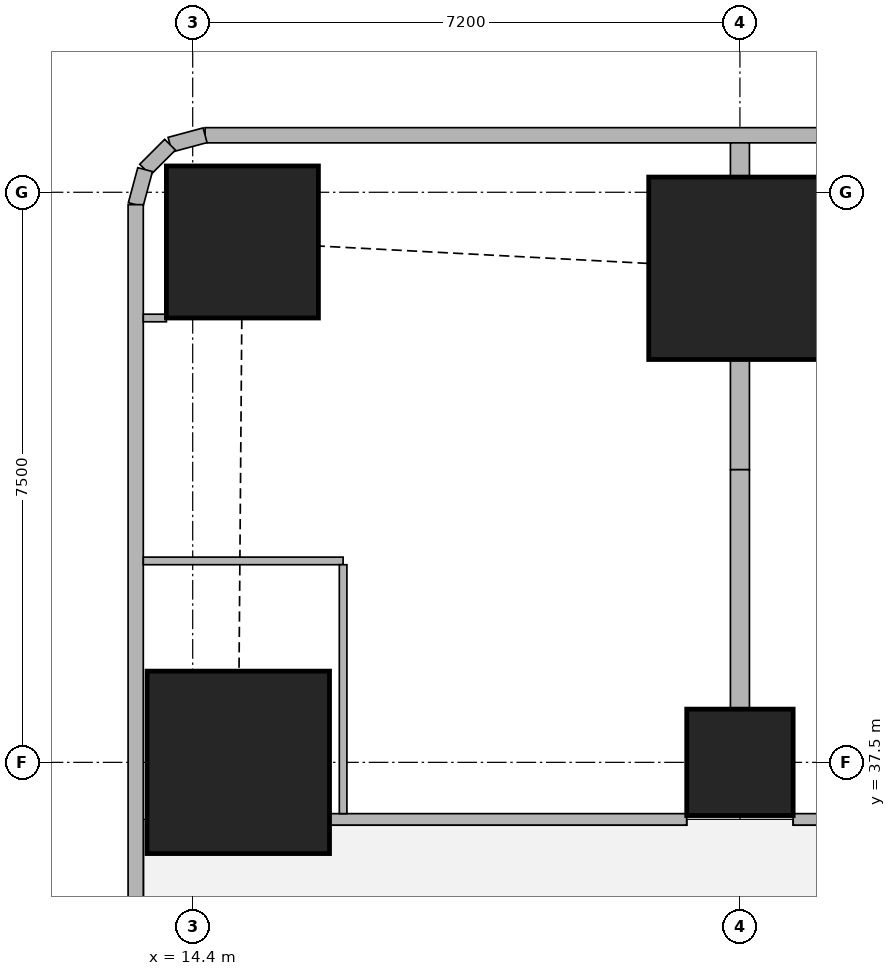
"""IFC4 building model, lengths in metres.
Left out: names, types, materials, properties, quantities, classifications, styles, units other than length and angle.
Written with IfcOpenShell. Run it as: python <this file> out.ifc"""

import sys

from ifc_helpers import new_model, si_unit, direction, frame, frame_2d, origin, origin_2d, place, context, subcontext, project, spatial, rectangle, extrude, element, fill, save


model = new_model("IFC4")
c1 = context("Model", 3, precision=1e-05, world=origin(), true_north=direction((0.0, 1.0)))
c2 = subcontext(c1, "Body", "Model", "MODEL_VIEW")
j1 = project(units=[si_unit("LENGTHUNIT", "METRE"), si_unit("PLANEANGLEUNIT", "RADIAN")], contexts=[c1])
p1 = place(None, origin())
s1 = spatial("IfcSite", under=j1, at=p1, CompositionType="ELEMENT")
p2 = place(p1, origin())
s2 = spatial("IfcBuilding", under=s1, at=p2, CompositionType="ELEMENT")
p3 = place(p2, frame((0.0, 0.0, 234.95)))
s3 = spatial("IfcBuildingStorey", under=s2, at=p3, CompositionType="ELEMENT", Elevation=234.95)
p4 = place(p3, frame((15.0, 37.5, 0.0), z_axis=(0.0, 0.0, 1.0), x_axis=(1.0, 0.0, 0.0)))
e1 = element("IfcColumn", 1, at=p4, inside=s3, PredefinedType="COLUMN", context=c2, shape_type="SweptSolid", body=[
    extrude(rectangle(XDim=2.4, YDim=2.4, at=origin_2d()), origin(), (0.0, 0.0, 1.0), 3.75),
])
p5 = place(p3, frame((21.6, 37.5, 0.0), z_axis=(0.0, 0.0, 1.0), x_axis=(1.0, 0.0, 0.0)))
e2 = element("IfcColumn", 2, at=p5, inside=s3, PredefinedType="COLUMN", context=c2, shape_type="SweptSolid", body=[
    extrude(rectangle(XDim=1.4, YDim=1.4, at=origin_2d()), origin(), (0.0, 0.0, 1.0), 3.75),
])
p6 = place(p3, frame((15.054, 44.346, 0.0), z_axis=(0.0, 0.0, 1.0), x_axis=(1.0, 0.0, 0.0)))
e3 = element("IfcColumn", 3, at=p6, inside=s3, PredefinedType="COLUMN", context=c2, shape_type="SweptSolid", body=[
    extrude(rectangle(XDim=2.0, YDim=2.0, at=origin_2d()), origin(), (0.0, 0.0, 1.0), 3.75),
])
p7 = place(p3, frame((21.6, 44.0, 0.0), z_axis=(0.0, 0.0, 1.0), x_axis=(1.0, 0.0, 0.0)))
e4 = element("IfcColumn", 4, at=p7, inside=s3, PredefinedType="COLUMN", context=c2, shape_type="SweptSolid", body=[
    extrude(rectangle(XDim=2.4, YDim=2.4, at=origin_2d()), origin(), (0.0, 0.0, 1.0), 3.75),
])
p8 = place(p3, frame((40.106, 45.75, 0.0), z_axis=(0.0, 0.0, 1.0), x_axis=(-1.0, 0.0, 0.0)))
e5 = element("IfcWall", 5, at=p8, inside=s3, PredefinedType="SOLIDWALL", context=c2, shape_type="SweptSolid", body=[
    extrude(rectangle(XDim=25.543, YDim=0.2, at=frame_2d((12.771, 0.0))), origin(), (0.0, 0.0, 1.0), 3.5),
])
p9 = place(p8, frame((8.606, 0.0, 0.9)))
e6 = element("IfcOpeningElement", 6, at=p9, cuts=e5, PredefinedType="OPENING", context=c2, shape_type="SweptSolid", body=[
    extrude(rectangle(XDim=1.8, YDim=1.5, at=frame_2d((0.9, 0.75))), frame((0.0, 0.11, 0.0), z_axis=(0.0, -1.0, 0.0), x_axis=(1.0, 0.0, 0.0)), (0.0, 0.0, 1.0), 0.22),
])
p10 = place(p8, frame((12.206, 0.0, 0.9)))
e7 = element("IfcOpeningElement", 7, at=p10, cuts=e5, PredefinedType="OPENING", context=c2, shape_type="SweptSolid", body=[
    extrude(rectangle(XDim=1.8, YDim=1.5, at=frame_2d((0.9, 0.75))), frame((0.0, 0.11, 0.0), z_axis=(0.0, -1.0, 0.0), x_axis=(1.0, 0.0, 0.0)), (0.0, 0.0, 1.0), 0.22),
])
p11 = place(p8, frame((15.806, 0.0, 0.9)))
e8 = element("IfcOpeningElement", 8, at=p11, cuts=e5, PredefinedType="OPENING", context=c2, shape_type="SweptSolid", body=[
    extrude(rectangle(XDim=1.8, YDim=1.5, at=frame_2d((0.9, 0.75))), frame((0.0, 0.11, 0.0), z_axis=(0.0, -1.0, 0.0), x_axis=(1.0, 0.0, 0.0)), (0.0, 0.0, 1.0), 0.22),
])
p12 = place(p8, frame((20.825, 0.0, 0.9)))
e9 = element("IfcOpeningElement", 9, at=p12, cuts=e5, PredefinedType="OPENING", context=c2, shape_type="SweptSolid", body=[
    extrude(rectangle(XDim=2.4, YDim=1.5, at=frame_2d((1.2, 0.75))), frame((0.0, 0.11, 0.0), z_axis=(0.0, -1.0, 0.0), x_axis=(1.0, 0.0, 0.0)), (0.0, 0.0, 1.0), 0.22),
])
p13 = place(p3, frame((14.563, 45.75, 0.0), z_axis=(0.0, 0.0, 1.0), x_axis=(-0.965655254015, -0.259826731483, 0.0)))
e10 = element("IfcWall", 10, at=p13, inside=s3, PredefinedType="SOLIDWALL", context=c2, shape_type="SweptSolid", body=[
    extrude(rectangle(XDim=0.477, YDim=0.2, at=frame_2d((0.239, 0.0))), origin(), (0.0, 0.0, 1.0), 3.5),
])
p14 = place(p3, frame((14.102, 45.626, 0.0), z_axis=(0.0, 0.0, 1.0), x_axis=(-0.707369890659, -0.706843573776, 0.0)))
e11 = element("IfcWall", 11, at=p14, inside=s3, PredefinedType="SOLIDWALL", context=c2, shape_type="SweptSolid", body=[
    extrude(rectangle(XDim=0.464, YDim=0.2, at=frame_2d((0.232, 0.0))), origin(), (0.0, 0.0, 1.0), 3.5),
])
p15 = place(p3, frame((13.774, 45.298, 0.0), z_axis=(0.0, 0.0, 1.0), x_axis=(-0.259698463175, -0.965689757751, 0.0)))
e12 = element("IfcWall", 12, at=p15, inside=s3, PredefinedType="SOLIDWALL", context=c2, shape_type="SweptSolid", body=[
    extrude(rectangle(XDim=0.478, YDim=0.2, at=frame_2d((0.239, 0.0))), origin(), (0.0, 0.0, 1.0), 3.5),
])
p16 = place(p3, frame((13.65, 44.837, 0.0), z_axis=(0.0, 0.0, 1.0), x_axis=(0.0, -1.0, 0.0)))
e13 = element("IfcWall", 13, at=p16, inside=s3, PredefinedType="SOLIDWALL", context=c2, shape_type="SweptSolid", body=[
    extrude(rectangle(XDim=44.674, YDim=0.2, at=frame_2d((22.337, 0.0))), origin(), (0.0, 0.0, 1.0), 3.5),
])
p17 = place(p16, frame((1.889, 0.0, 0.9)))
e14 = element("IfcOpeningElement", 14, at=p17, cuts=e13, PredefinedType="OPENING", context=c2, shape_type="SweptSolid", body=[
    extrude(rectangle(XDim=2.4, YDim=1.5, at=frame_2d((1.2, 0.75))), frame((0.0, 0.11, 0.0), z_axis=(0.0, -1.0, 0.0), x_axis=(1.0, 0.0, 0.0)), (0.0, 0.0, 1.0), 0.22),
])
p18 = place(p16, frame((40.385, 0.0, 0.9)))
e15 = element("IfcOpeningElement", 15, at=p18, cuts=e13, PredefinedType="OPENING", context=c2, shape_type="SweptSolid", body=[
    extrude(rectangle(XDim=2.4, YDim=1.5, at=frame_2d((1.2, 0.75))), frame((0.0, 0.11, 0.0), z_axis=(0.0, -1.0, 0.0), x_axis=(1.0, 0.0, 0.0)), (0.0, 0.0, 1.0), 0.22),
])
p19 = place(p3, frame((16.201, 36.75, 0.0), z_axis=(0.0, 0.0, 1.0), x_axis=(1.0, 0.0, 0.0)))
e16 = element("IfcWall", 16, at=p19, inside=s3, PredefinedType="SOLIDWALL", context=c2, shape_type="SweptSolid", body=[
    extrude(rectangle(XDim=4.698, YDim=0.15, at=frame_2d((2.349, 0.0))), origin(), (0.0, 0.0, 1.0), 3.5),
])
p20 = place(p19, frame((0.353, 0.0, 0.0)))
e17 = element("IfcOpeningElement", 17, at=p20, cuts=e16, PredefinedType="OPENING", context=c2, shape_type="SweptSolid", body=[
    extrude(rectangle(XDim=1.0, YDim=2.1, at=frame_2d((0.5, 1.05))), frame((0.0, 0.085, 0.0), z_axis=(0.0, -1.0, 0.0), x_axis=(1.0, 0.0, 0.0)), (0.0, 0.0, 1.0), 0.17),
])
p21 = place(p3, frame((22.301, 36.75, 0.0), z_axis=(0.0, 0.0, 1.0), x_axis=(1.0, 0.0, 0.0)))
e18 = element("IfcWall", 18, at=p21, inside=s3, PredefinedType="SOLIDWALL", context=c2, shape_type="SweptSolid", body=[
    extrude(rectangle(XDim=5.798, YDim=0.15, at=frame_2d((2.899, 0.0))), origin(), (0.0, 0.0, 1.0), 3.5),
])
p22 = place(p21, frame((0.799, 0.0, 0.0)))
e19 = element("IfcOpeningElement", 19, at=p22, cuts=e18, PredefinedType="OPENING", context=c2, shape_type="SweptSolid", body=[
    extrude(rectangle(XDim=1.0, YDim=2.1, at=frame_2d((0.5, 1.05))), frame((0.0, 0.085, 0.0), z_axis=(0.0, -1.0, 0.0), x_axis=(1.0, 0.0, 0.0)), (0.0, 0.0, 1.0), 0.17),
])
p23 = place(p3, frame((14.054, 43.346, 0.0), z_axis=(0.0, 0.0, 1.0), x_axis=(-1.0, 0.0, 0.0)))
e20 = element("IfcWall", 20, at=p23, inside=s3, PredefinedType="PARTITIONING", context=c2, shape_type="SweptSolid", body=[
    extrude(rectangle(XDim=0.304, YDim=0.1, at=frame_2d((0.152, 0.0))), origin(), (0.0, 0.0, 1.0), 2.05),
])
p24 = place(p3, frame((13.75, 40.15, 0.0), z_axis=(0.0, 0.0, 1.0), x_axis=(1.0, 0.0, 0.0)))
e21 = element("IfcWall", 21, at=p24, inside=s3, PredefinedType="PARTITIONING", context=c2, shape_type="SweptSolid", body=[
    extrude(rectangle(XDim=2.629, YDim=0.1, at=frame_2d((1.314, 0.0))), origin(), (0.0, 0.0, 1.0), 2.05),
])
p25 = place(p3, frame((16.379, 36.825, 0.0), z_axis=(0.0, 0.0, 1.0), x_axis=(0.0, 1.0, 0.0)))
e22 = element("IfcWall", 22, at=p25, inside=s3, PredefinedType="PARTITIONING", context=c2, shape_type="SweptSolid", body=[
    extrude(rectangle(XDim=3.275, YDim=0.1, at=frame_2d((1.638, 0.0))), origin(), (0.0, 0.0, 1.0), 3.5),
])
p26 = place(p25, frame((2.225, 0.0, 0.0)))
e23 = element("IfcOpeningElement", 23, at=p26, cuts=e22, PredefinedType="OPENING", context=c2, shape_type="SweptSolid", body=[
    extrude(rectangle(XDim=0.9, YDim=2.1, at=frame_2d((0.45, 1.05))), frame((0.0, 0.06, 0.0), z_axis=(0.0, -1.0, 0.0), x_axis=(1.0, 0.0, 0.0)), (0.0, 0.0, 1.0), 0.12),
])
p27 = place(p3, frame((21.6, 41.35, 0.0), z_axis=(0.0, 0.0, 1.0), x_axis=(0.0, 1.0, 0.0)))
e24 = element("IfcWall", 24, at=p27, inside=s3, PredefinedType="SOLIDWALL", context=c2, shape_type="SweptSolid", body=[
    extrude(rectangle(XDim=1.449, YDim=0.25, at=frame_2d((0.725, 0.0))), origin(), (0.0, 0.0, 1.0), 2.05),
])
p28 = place(p3, frame((21.6, 45.201, 0.0), z_axis=(0.0, 0.0, 1.0), x_axis=(0.0, 1.0, 0.0)))
e25 = element("IfcWall", 25, at=p28, inside=s3, PredefinedType="SOLIDWALL", context=c2, shape_type="SweptSolid", body=[
    extrude(rectangle(XDim=0.449, YDim=0.25, at=frame_2d((0.225, 0.0))), origin(), (0.0, 0.0, 1.0), 2.05),
])
p29 = place(p3, frame((21.6, 38.201, 0.0), z_axis=(0.0, 0.0, 1.0), x_axis=(0.0, 1.0, 0.0)))
e26 = element("IfcWall", 26, at=p29, inside=s3, PredefinedType="SOLIDWALL", context=c2, shape_type="SweptSolid", body=[
    extrude(rectangle(XDim=3.149, YDim=0.25, at=frame_2d((1.575, 0.0))), origin(), (0.0, 0.0, 1.0), 3.5),
])
p30 = place(p11, origin())
e27 = element("IfcWindow", 27, at=p30, inside=s3, PartitioningType="SINGLE_PANEL", PredefinedType="WINDOW", context=c2, shape_type="SweptSolid", body=[
    extrude(rectangle(XDim=1.8, YDim=1.5, at=frame_2d((0.9, 0.75))), frame((0.0, 0.03, 0.0), z_axis=(0.0, -1.0, 0.0), x_axis=(1.0, 0.0, 0.0)), (0.0, 0.0, 1.0), 0.06),
])
fill(e8, e27)
p31 = place(p12, origin())
e28 = element("IfcWindow", 28, at=p31, inside=s3, PartitioningType="SINGLE_PANEL", PredefinedType="WINDOW", context=c2, shape_type="SweptSolid", body=[
    extrude(rectangle(XDim=2.4, YDim=1.5, at=frame_2d((1.2, 0.75))), frame((0.0, 0.03, 0.0), z_axis=(0.0, -1.0, 0.0), x_axis=(1.0, 0.0, 0.0)), (0.0, 0.0, 1.0), 0.06),
])
fill(e9, e28)
p32 = place(p17, origin())
e29 = element("IfcWindow", 29, at=p32, inside=s3, PartitioningType="SINGLE_PANEL", PredefinedType="WINDOW", context=c2, shape_type="SweptSolid", body=[
    extrude(rectangle(XDim=2.4, YDim=1.5, at=frame_2d((1.2, 0.75))), frame((0.0, 0.03, 0.0), z_axis=(0.0, -1.0, 0.0), x_axis=(1.0, 0.0, 0.0)), (0.0, 0.0, 1.0), 0.06),
])
fill(e14, e29)
p33 = place(p26, origin())
e30 = element("IfcDoor", 30, at=p33, inside=s3, OperationType="SINGLE_SWING_RIGHT", PredefinedType="DOOR", context=c2, shape_type="SweptSolid", body=[
    extrude(rectangle(XDim=0.9, YDim=2.1, at=frame_2d((0.45, 1.05))), frame((0.0, 0.025, 0.0), z_axis=(0.0, -1.0, 0.0), x_axis=(1.0, 0.0, 0.0)), (0.0, 0.0, 1.0), 0.05),
])
fill(e23, e30)
p34 = place(p20, origin())
e31 = element("IfcDoor", 31, at=p34, inside=s3, OperationType="SINGLE_SWING_LEFT", PredefinedType="DOOR", context=c2, shape_type="SweptSolid", body=[
    extrude(rectangle(XDim=1.0, YDim=2.1, at=frame_2d((0.5, 1.05))), frame((0.0, 0.025, 0.0), z_axis=(0.0, -1.0, 0.0), x_axis=(1.0, 0.0, 0.0)), (0.0, 0.0, 1.0), 0.05),
])
fill(e17, e31)
save(model, sys.argv[1])
